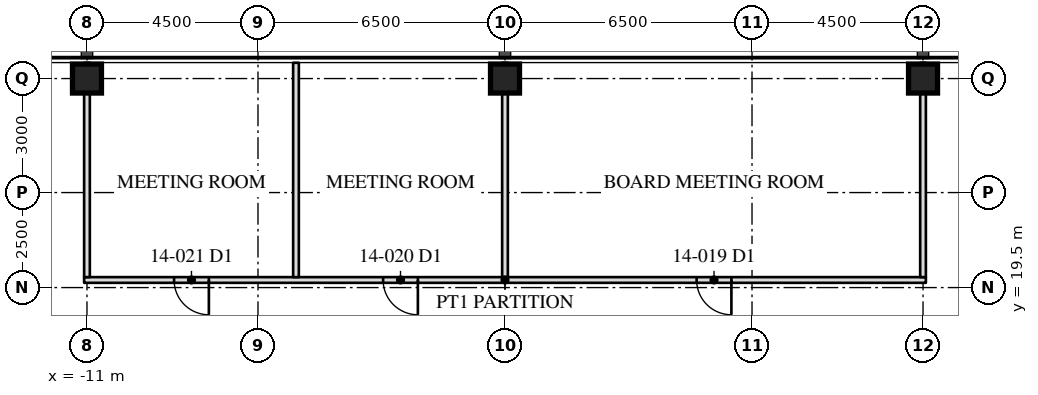
"""IFC4 building model, lengths in metres.
Left out: names, types, materials, properties, quantities, classifications, styles, units other than length and angle.
Written with IfcOpenShell. Run it as: python <this file> out.ifc"""

import sys

from ifc_helpers import new_model, si_unit, direction, frame, frame_2d, origin, origin_2d, place, context, subcontext, project, spatial, rectangle, hollow_rectangle, extrude, element, fill, save


model = new_model("IFC4")
c1 = context("Model", 3, precision=1e-05, world=origin(), true_north=direction((0.0, 1.0)))
c2 = subcontext(c1, "Body", "Model", "MODEL_VIEW")
j1 = project(units=[si_unit("LENGTHUNIT", "METRE"), si_unit("PLANEANGLEUNIT", "RADIAN")], contexts=[c1])
p1 = place(None, origin())
s1 = spatial("IfcSite", under=j1, at=p1, CompositionType="ELEMENT")
p2 = place(p1, origin())
s2 = spatial("IfcBuilding", under=s1, at=p2, CompositionType="ELEMENT")
p3 = place(p2, frame((0.0, 0.0, 61.1)))
s3 = spatial("IfcBuildingStorey", under=s2, at=p3, CompositionType="ELEMENT", Elevation=61.1)
for number, where, z_axis, x_axis in (
    (1, (11.0, 25.0, 0.0), (0.0, 0.0, 1.0), (1.0, 0.0, 0.0)),
    (2, (0.0, 25.0, 0.0), (0.0, 0.0, 1.0), (1.0, 0.0, 0.0)),
    (3, (-11.0, 25.0, 0.0), (0.0, 0.0, 1.0), (1.0, 0.0, 0.0)),
):
    element("IfcColumn", number, at=place(p3, frame(where, z_axis=z_axis, x_axis=x_axis)), inside=s3, PredefinedType="COLUMN", context=c2, shape_type="SweptSolid", body=[
        extrude(hollow_rectangle(XDim=0.762, YDim=0.762, WallThickness=0.127, at=origin_2d()), origin(), (0.0, 0.0, 1.0), 4.1),
    ])
p4 = place(p3, frame((11.075, 19.7, 0.0), z_axis=(0.0, 0.0, 1.0), x_axis=(-1.0, 0.0, 0.0)))
e4 = element("IfcWall", 4, at=p4, inside=s3, PredefinedType="PARTITIONING", context=c2, shape_type="SweptSolid", body=[
    extrude(rectangle(XDim=22.15, YDim=0.15, at=frame_2d((11.075, 0.0))), origin(), (0.0, 0.0, 1.0), 3.91),
])
p5 = place(p4, frame((5.117, 0.0, 0.0)))
e5 = element("IfcOpeningElement", 5, at=p5, cuts=e4, PredefinedType="OPENING", context=c2, shape_type="SweptSolid", body=[
    extrude(rectangle(XDim=0.915, YDim=2.134, at=frame_2d((0.458, 1.067))), frame((0.0, 0.085, 0.0), z_axis=(0.0, -1.0, 0.0), x_axis=(1.0, 0.0, 0.0)), (0.0, 0.0, 1.0), 0.17),
])
p6 = place(p4, frame((13.367, 0.0, 0.0)))
e6 = element("IfcOpeningElement", 6, at=p6, cuts=e4, PredefinedType="OPENING", context=c2, shape_type="SweptSolid", body=[
    extrude(rectangle(XDim=0.915, YDim=2.134, at=frame_2d((0.458, 1.067))), frame((0.0, 0.085, 0.0), z_axis=(0.0, -1.0, 0.0), x_axis=(1.0, 0.0, 0.0)), (0.0, 0.0, 1.0), 0.17),
])
p7 = place(p4, frame((18.867, 0.0, 0.0)))
e7 = element("IfcOpeningElement", 7, at=p7, cuts=e4, PredefinedType="OPENING", context=c2, shape_type="SweptSolid", body=[
    extrude(rectangle(XDim=0.915, YDim=2.134, at=frame_2d((0.458, 1.067))), frame((0.0, 0.085, 0.0), z_axis=(0.0, -1.0, 0.0), x_axis=(1.0, 0.0, 0.0)), (0.0, 0.0, 1.0), 0.17),
])
for number, where, z_axis, x_axis in (
    (8, (11.0, 19.775, 0.0), (0.0, 0.0, 1.0), (0.0, 1.0, 0.0)),
    (9, (0.0, 19.775, 0.0), (0.0, 0.0, 1.0), (0.0, 1.0, 0.0)),
):
    element("IfcWall", number, at=place(p3, frame(where, z_axis=z_axis, x_axis=x_axis)), inside=s3, PredefinedType="PARTITIONING", context=c2, shape_type="SweptSolid", body=[
        extrude(rectangle(XDim=5.64, YDim=0.15, at=frame_2d((2.82, 0.0))), origin(), (0.0, 0.0, 1.0), 3.13),
    ])
p8 = place(p3, frame((-5.5, 19.775, 0.0), z_axis=(0.0, 0.0, 1.0), x_axis=(0.0, 1.0, 0.0)))
e10 = element("IfcWall", 10, at=p8, inside=s3, PredefinedType="PARTITIONING", context=c2, shape_type="SweptSolid", body=[
    extrude(rectangle(XDim=5.64, YDim=0.15, at=frame_2d((2.82, 0.0))), origin(), (0.0, 0.0, 1.0), 3.91),
])
p9 = place(p3, frame((-11.0, 19.775, 0.0), z_axis=(0.0, 0.0, 1.0), x_axis=(0.0, 1.0, 0.0)))
e11 = element("IfcWall", 11, at=p9, inside=s3, PredefinedType="PARTITIONING", context=c2, shape_type="SweptSolid", body=[
    extrude(rectangle(XDim=5.64, YDim=0.15, at=frame_2d((2.82, 0.0))), origin(), (0.0, 0.0, 1.0), 3.13),
])
p10 = place(p5, origin())
e12 = element("IfcDoor", 12, at=p10, inside=s3, OperationType="SINGLE_SWING_LEFT", PredefinedType="DOOR", context=c2, shape_type="SweptSolid", body=[
    extrude(rectangle(XDim=0.915, YDim=2.134, at=frame_2d((0.458, 1.067))), frame((0.0, 0.025, 0.0), z_axis=(0.0, -1.0, 0.0), x_axis=(1.0, 0.0, 0.0)), (0.0, 0.0, 1.0), 0.05),
])
fill(e5, e12)
p11 = place(p6, origin())
e13 = element("IfcDoor", 13, at=p11, inside=s3, OperationType="SINGLE_SWING_LEFT", PredefinedType="DOOR", context=c2, shape_type="SweptSolid", body=[
    extrude(rectangle(XDim=0.915, YDim=2.134, at=frame_2d((0.458, 1.067))), frame((0.0, 0.025, 0.0), z_axis=(0.0, -1.0, 0.0), x_axis=(1.0, 0.0, 0.0)), (0.0, 0.0, 1.0), 0.05),
])
fill(e6, e13)
p12 = place(p7, origin())
e14 = element("IfcDoor", 14, at=p12, inside=s3, OperationType="SINGLE_SWING_LEFT", PredefinedType="DOOR", context=c2, shape_type="SweptSolid", body=[
    extrude(rectangle(XDim=0.915, YDim=2.134, at=frame_2d((0.458, 1.067))), frame((0.0, 0.025, 0.0), z_axis=(0.0, -1.0, 0.0), x_axis=(1.0, 0.0, 0.0)), (0.0, 0.0, 1.0), 0.05),
])
fill(e7, e14)
save(model, sys.argv[1])
